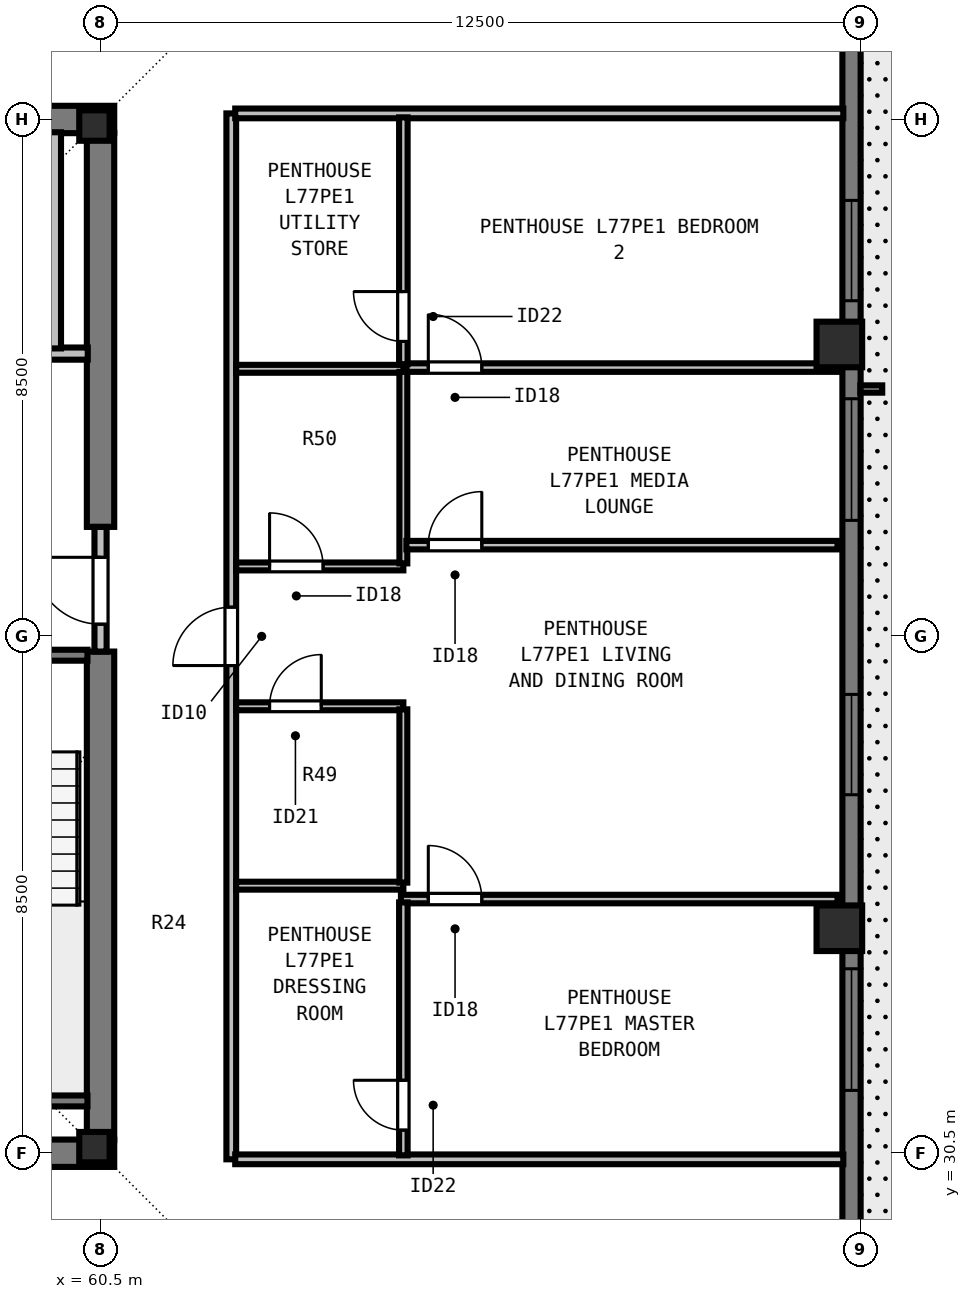
"""IFC4 building model, lengths in metres.
Left out: names, types, materials, properties, quantities, classifications, styles, units other than length and angle.
Written with IfcOpenShell. Run it as: python <this file> out.ifc"""

import sys

from ifc_helpers import new_model, si_unit, direction, frame, frame_2d, origin, origin_2d, place, context, subcontext, project, spatial, rectangle, i_section, extrude, element, fill, save


model = new_model("IFC4")
c1 = context("Model", 3, precision=1e-05, world=origin(), true_north=direction((0.0, 1.0)))
c2 = subcontext(c1, "Body", "Model", "MODEL_VIEW")
j1 = project(units=[si_unit("LENGTHUNIT", "METRE"), si_unit("PLANEANGLEUNIT", "RADIAN")], contexts=[c1])
p1 = place(None, origin())
s1 = spatial("IfcSite", under=j1, at=p1, CompositionType="ELEMENT")
p2 = place(p1, origin())
s2 = spatial("IfcBuilding", under=s1, at=p2, CompositionType="ELEMENT")
p3 = place(p2, frame((0.0, 0.0, 280.5)))
s3 = spatial("IfcBuildingStorey", under=s2, at=p3, CompositionType="ELEMENT", Elevation=280.5)
for number, where, z_axis, x_axis in (
    (1, (60.4, 30.6, 0.0), (0.0, 0.0, 1.0), (1.0, 0.0, 0.0)),
    (2, (60.4, 47.4, 0.0), (0.0, 0.0, 1.0), (1.0, 0.0, 0.0)),
):
    element("IfcColumn", number, at=place(p3, frame(where, z_axis=z_axis, x_axis=x_axis)), inside=s3, PredefinedType="COLUMN", context=c2, shape_type="SweptSolid", body=[
        extrude(i_section(OverallWidth=0.5, OverallDepth=0.5, WebThickness=0.028, FlangeThickness=0.045, at=origin_2d()), origin(), (0.0, 0.0, 1.0), 3.5),
    ])
for number, where, z_axis, x_axis in (
    (3, (72.65, 34.2, 0.0), (0.0, 0.0, 1.0), (0.0, 1.0, 0.0)),
    (4, (72.65, 43.8, 0.0), (0.0, 0.0, 1.0), (0.0, 1.0, 0.0)),
):
    element("IfcColumn", number, at=place(p3, frame(where, z_axis=z_axis, x_axis=x_axis)), inside=s3, PredefinedType="COLUMN", context=c2, shape_type="SweptSolid", body=[
        extrude(rectangle(XDim=0.75, YDim=0.75, at=origin_2d()), origin(), (0.0, 0.0, 1.0), 3.5),
    ])
p4 = place(p3, frame((72.85, 54.5, 0.0), z_axis=(0.0, 0.0, 1.0), x_axis=(0.0, -1.0, 0.0)))
e5 = element("IfcWall", 5, at=p4, inside=s3, PredefinedType="SOLIDWALL", context=c2, shape_type="SweptSolid", body=[
    extrude(rectangle(XDim=30.722, YDim=0.3, at=frame_2d((15.361, 0.0))), origin(), (0.0, 0.0, 1.0), 3.29),
])
p5 = place(p4, frame((8.331, 0.0, 0.8)))
e6 = element("IfcOpeningElement", 6, at=p5, cuts=e5, PredefinedType="OPENING", context=c2, shape_type="SweptSolid", body=[
    extrude(rectangle(XDim=1.65, YDim=1.758, at=frame_2d((0.825, 0.879))), frame((0.0, 0.16, 0.0), z_axis=(0.0, -1.0, 0.0), x_axis=(1.0, 0.0, 0.0)), (0.0, 0.0, 1.0), 0.32),
])
p6 = place(p4, frame((11.593, 0.0, 0.8)))
e7 = element("IfcOpeningElement", 7, at=p6, cuts=e5, PredefinedType="OPENING", context=c2, shape_type="SweptSolid", body=[
    extrude(rectangle(XDim=2.0, YDim=1.758, at=frame_2d((1.0, 0.879))), frame((0.0, 0.16, 0.0), z_axis=(0.0, -1.0, 0.0), x_axis=(1.0, 0.0, 0.0)), (0.0, 0.0, 1.0), 0.32),
])
p7 = place(p4, frame((16.455, 0.0, 0.8)))
e8 = element("IfcOpeningElement", 8, at=p7, cuts=e5, PredefinedType="OPENING", context=c2, shape_type="SweptSolid", body=[
    extrude(rectangle(XDim=1.65, YDim=1.758, at=frame_2d((0.825, 0.879))), frame((0.0, 0.16, 0.0), z_axis=(0.0, -1.0, 0.0), x_axis=(1.0, 0.0, 0.0)), (0.0, 0.0, 1.0), 0.32),
])
p8 = place(p4, frame((20.967, 0.0, 0.8)))
e9 = element("IfcOpeningElement", 9, at=p8, cuts=e5, PredefinedType="OPENING", context=c2, shape_type="SweptSolid", body=[
    extrude(rectangle(XDim=2.0, YDim=1.758, at=frame_2d((1.0, 0.879))), frame((0.0, 0.16, 0.0), z_axis=(0.0, -1.0, 0.0), x_axis=(1.0, 0.0, 0.0)), (0.0, 0.0, 1.0), 0.32),
])
for number, where, z_axis, x_axis in (
    (10, (43.275, 30.5, 0.0), (0.0, 0.0, 1.0), (1.0, 0.0, 0.0)),
    (11, (43.275, 47.5, 0.0), (0.0, 0.0, 1.0), (1.0, 0.0, 0.0)),
):
    element("IfcWall", number, at=place(p3, frame(where, z_axis=z_axis, x_axis=x_axis)), inside=s3, PredefinedType="SHEAR", context=c2, shape_type="SweptSolid", body=[
        extrude(rectangle(XDim=17.45, YDim=0.45, at=frame_2d((8.725, 0.0))), origin(), (0.0, 0.0, 1.0), 3.29),
    ])
p9 = place(p3, frame((60.5, 30.715, 0.0), z_axis=(0.0, 0.0, 1.0), x_axis=(0.0, 1.0, 0.0)))
e12 = element("IfcWall", 12, at=p9, inside=s3, PredefinedType="SHEAR", context=c2, shape_type="SweptSolid", body=[
    extrude(rectangle(XDim=8.035, YDim=0.45, at=frame_2d((4.018, 0.0))), origin(), (0.0, 0.0, 1.0), 3.29),
])
p10 = place(p3, frame((60.5, 40.8, 0.0), z_axis=(0.0, 0.0, 1.0), x_axis=(0.0, 1.0, 0.0)))
e13 = element("IfcWall", 13, at=p10, inside=s3, PredefinedType="SHEAR", context=c2, shape_type="SweptSolid", body=[
    extrude(rectangle(XDim=6.485, YDim=0.45, at=frame_2d((3.242, 0.0))), origin(), (0.0, 0.0, 1.0), 3.29),
])
p11 = place(p3, frame((60.5, 38.75, 0.0), z_axis=(0.0, 0.0, 1.0), x_axis=(0.0, 1.0, 0.0)))
e14 = element("IfcWall", 14, at=p11, inside=s3, PredefinedType="SOLIDWALL", context=c2, shape_type="SweptSolid", body=[
    extrude(rectangle(XDim=2.05, YDim=0.2, at=frame_2d((1.025, 0.0))), origin(), (0.0, 0.0, 1.0), 3.29),
])
p12 = place(p11, frame((0.45, 0.0, 0.0)))
e15 = element("IfcOpeningElement", 15, at=p12, cuts=e14, PredefinedType="OPENING", context=c2, shape_type="SweptSolid", body=[
    extrude(rectangle(XDim=1.1, YDim=2.15, at=frame_2d((0.55, 1.075))), frame((0.0, 0.11, 0.0), z_axis=(0.0, -1.0, 0.0), x_axis=(1.0, 0.0, 0.0)), (0.0, 0.0, 1.0), 0.22),
])
p13 = place(p3, frame((56.735, 43.65, 0.0), z_axis=(0.0, 0.0, 1.0), x_axis=(1.0, 0.0, 0.0)))
e16 = element("IfcWall", 16, at=p13, inside=s3, PredefinedType="SOLIDWALL", context=c2, shape_type="SweptSolid", body=[
    extrude(rectangle(XDim=3.555, YDim=0.2, at=frame_2d((1.777, 0.0))), origin(), (0.0, 0.0, 1.0), 3.29),
])
p14 = place(p13, frame((1.295, 0.0, 0.0)))
e17 = element("IfcOpeningElement", 17, at=p14, cuts=e16, PredefinedType="OPENING", context=c2, shape_type="SweptSolid", body=[
    extrude(rectangle(XDim=1.1, YDim=2.2, at=frame_2d((0.55, 1.1))), frame((0.0, 0.11, 0.0), z_axis=(0.0, -1.0, 0.0), x_axis=(1.0, 0.0, 0.0)), (0.0, 0.0, 1.0), 0.22),
])
p15 = place(p3, frame((59.75, 43.735, 0.0), z_axis=(0.0, 0.0, 1.0), x_axis=(0.0, 1.0, 0.0)))
e18 = element("IfcWall", 18, at=p15, inside=s3, PredefinedType="SOLIDWALL", context=c2, shape_type="SweptSolid", body=[
    extrude(rectangle(XDim=3.555, YDim=0.2, at=frame_2d((1.777, 0.0))), origin(), (0.0, 0.0, 1.0), 3.29),
])
p16 = place(p3, frame((62.65, 30.4, 0.0), z_axis=(0.0, 0.0, 1.0), x_axis=(0.0, 1.0, 0.0)))
e19 = element("IfcWall", 19, at=p16, inside=s3, PredefinedType="PARTITIONING", context=c2, shape_type="SweptSolid", body=[
    extrude(rectangle(XDim=17.2, YDim=0.16, at=frame_2d((8.6, 0.0))), origin(), (0.0, 0.0, 1.0), 3.29),
])
p17 = place(p16, frame((8.12, 0.0, 0.0)))
e20 = element("IfcOpeningElement", 20, at=p17, cuts=e19, PredefinedType="OPENING", context=c2, shape_type="SweptSolid", body=[
    extrude(rectangle(XDim=0.96, YDim=2.18, at=frame_2d((0.48, 1.09))), frame((0.0, 0.09, 0.0), z_axis=(0.0, -1.0, 0.0), x_axis=(1.0, 0.0, 0.0)), (0.0, 0.0, 1.0), 0.18),
])
for number, where, z_axis, x_axis in (
    (21, (62.715, 30.4, 0.0), (0.0, 0.0, 1.0), (1.0, 0.0, 0.0)),
    (22, (62.715, 47.6, 0.0), (0.0, 0.0, 1.0), (1.0, 0.0, 0.0)),
):
    element("IfcWall", number, at=place(p3, frame(where, z_axis=z_axis, x_axis=x_axis)), inside=s3, PredefinedType="PARTITIONING", context=c2, shape_type="SweptSolid", body=[
        extrude(rectangle(XDim=10.0, YDim=0.16, at=frame_2d((5.0, 0.0))), origin(), (0.0, 0.0, 1.0), 3.29),
    ])
p18 = place(p3, frame((62.73, 34.9, 0.0), z_axis=(0.0, 0.0, 1.0), x_axis=(1.0, 0.0, 0.0)))
e23 = element("IfcWall", 23, at=p18, inside=s3, PredefinedType="PLUMBINGWALL", context=c2, shape_type="SweptSolid", body=[
    extrude(rectangle(XDim=2.75, YDim=0.13, at=frame_2d((1.375, 0.0))), origin(), (0.0, 0.0, 1.0), 3.29),
])
p19 = place(p3, frame((62.73, 37.85, 0.0), z_axis=(0.0, 0.0, 1.0), x_axis=(1.0, 0.0, 0.0)))
e24 = element("IfcWall", 24, at=p19, inside=s3, PredefinedType="PLUMBINGWALL", context=c2, shape_type="SweptSolid", body=[
    extrude(rectangle(XDim=2.75, YDim=0.13, at=frame_2d((1.375, 0.0))), origin(), (0.0, 0.0, 1.0), 3.29),
])
p20 = place(p19, frame((0.55, 0.0, 0.0)))
e25 = element("IfcOpeningElement", 25, at=p20, cuts=e24, PredefinedType="OPENING", context=c2, shape_type="SweptSolid", body=[
    extrude(rectangle(XDim=0.85, YDim=2.08, at=frame_2d((0.425, 1.04))), frame((0.0, 0.075, 0.0), z_axis=(0.0, -1.0, 0.0), x_axis=(1.0, 0.0, 0.0)), (0.0, 0.0, 1.0), 0.15),
])
p21 = place(p3, frame((65.48, 34.95, 0.0), z_axis=(0.0, 0.0, 1.0), x_axis=(0.0, 1.0, 0.0)))
e26 = element("IfcWall", 26, at=p21, inside=s3, PredefinedType="PLUMBINGWALL", context=c2, shape_type="SweptSolid", body=[
    extrude(rectangle(XDim=2.85, YDim=0.13, at=frame_2d((1.425, 0.0))), origin(), (0.0, 0.0, 1.0), 3.29),
])
p22 = place(p3, frame((62.73, 43.4, 0.0), z_axis=(0.0, 0.0, 1.0), x_axis=(1.0, 0.0, 0.0)))
e27 = element("IfcWall", 27, at=p22, inside=s3, PredefinedType="PLUMBINGWALL", context=c2, shape_type="SweptSolid", body=[
    extrude(rectangle(XDim=2.75, YDim=0.13, at=frame_2d((1.375, 0.0))), origin(), (0.0, 0.0, 1.0), 3.29),
])
p23 = place(p3, frame((62.73, 40.15, 0.0), z_axis=(0.0, 0.0, 1.0), x_axis=(1.0, 0.0, 0.0)))
e28 = element("IfcWall", 28, at=p23, inside=s3, PredefinedType="PLUMBINGWALL", context=c2, shape_type="SweptSolid", body=[
    extrude(rectangle(XDim=2.75, YDim=0.13, at=frame_2d((1.375, 0.0))), origin(), (0.0, 0.0, 1.0), 3.29),
])
p24 = place(p23, frame((0.55, 0.0, 0.0)))
e29 = element("IfcOpeningElement", 29, at=p24, cuts=e28, PredefinedType="OPENING", context=c2, shape_type="SweptSolid", body=[
    extrude(rectangle(XDim=0.88, YDim=2.1, at=frame_2d((0.44, 1.05))), frame((0.0, 0.075, 0.0), z_axis=(0.0, -1.0, 0.0), x_axis=(1.0, 0.0, 0.0)), (0.0, 0.0, 1.0), 0.15),
])
p25 = place(p3, frame((65.48, 40.2, 0.0), z_axis=(0.0, 0.0, 1.0), x_axis=(0.0, 1.0, 0.0)))
e30 = element("IfcWall", 30, at=p25, inside=s3, PredefinedType="PLUMBINGWALL", context=c2, shape_type="SweptSolid", body=[
    extrude(rectangle(XDim=3.15, YDim=0.13, at=frame_2d((1.575, 0.0))), origin(), (0.0, 0.0, 1.0), 3.29),
])
p26 = place(p3, frame((65.44, 34.68, 0.0), z_axis=(0.0, 0.0, 1.0), x_axis=(1.0, 0.0, 0.0)))
e31 = element("IfcWall", 31, at=p26, inside=s3, PredefinedType="PARTITIONING", context=c2, shape_type="SweptSolid", body=[
    extrude(rectangle(XDim=7.18, YDim=0.14, at=frame_2d((3.59, 0.0))), origin(), (0.0, 0.0, 1.0), 3.29),
])
p27 = place(p26, frame((0.45, 0.0, 0.0)))
e32 = element("IfcOpeningElement", 32, at=p27, cuts=e31, PredefinedType="OPENING", context=c2, shape_type="SweptSolid", body=[
    extrude(rectangle(XDim=0.88, YDim=2.1, at=frame_2d((0.44, 1.05))), frame((0.0, 0.08, 0.0), z_axis=(0.0, -1.0, 0.0), x_axis=(1.0, 0.0, 0.0)), (0.0, 0.0, 1.0), 0.16),
])
p28 = place(p3, frame((65.48, 30.465, 0.0), z_axis=(0.0, 0.0, 1.0), x_axis=(0.0, 1.0, 0.0)))
e33 = element("IfcWall", 33, at=p28, inside=s3, PredefinedType="PARTITIONING", context=c2, shape_type="SweptSolid", body=[
    extrude(rectangle(XDim=4.16, YDim=0.14, at=frame_2d((2.08, 0.0))), origin(), (0.0, 0.0, 1.0), 3.29),
])
p29 = place(p28, frame((0.415, 0.0, 0.0)))
e34 = element("IfcOpeningElement", 34, at=p29, cuts=e33, PredefinedType="OPENING", context=c2, shape_type="SweptSolid", body=[
    extrude(rectangle(XDim=0.82, YDim=2.1, at=frame_2d((0.41, 1.05))), frame((0.0, 0.08, 0.0), z_axis=(0.0, -1.0, 0.0), x_axis=(1.0, 0.0, 0.0)), (0.0, 0.0, 1.0), 0.16),
])
p30 = place(p3, frame((65.53, 43.42, 0.0), z_axis=(0.0, 0.0, 1.0), x_axis=(1.0, 0.0, 0.0)))
e35 = element("IfcWall", 35, at=p30, inside=s3, PredefinedType="PARTITIONING", context=c2, shape_type="SweptSolid", body=[
    extrude(rectangle(XDim=7.09, YDim=0.14, at=frame_2d((3.545, 0.0))), origin(), (0.0, 0.0, 1.0), 3.29),
])
p31 = place(p30, frame((0.36, 0.0, 0.0)))
e36 = element("IfcOpeningElement", 36, at=p31, cuts=e35, PredefinedType="OPENING", context=c2, shape_type="SweptSolid", body=[
    extrude(rectangle(XDim=0.88, YDim=2.1, at=frame_2d((0.44, 1.05))), frame((0.0, 0.08, 0.0), z_axis=(0.0, -1.0, 0.0), x_axis=(1.0, 0.0, 0.0)), (0.0, 0.0, 1.0), 0.16),
])
p32 = place(p3, frame((65.48, 43.475, 0.0), z_axis=(0.0, 0.0, 1.0), x_axis=(0.0, 1.0, 0.0)))
e37 = element("IfcWall", 37, at=p32, inside=s3, PredefinedType="PARTITIONING", context=c2, shape_type="SweptSolid", body=[
    extrude(rectangle(XDim=4.06, YDim=0.14, at=frame_2d((2.03, 0.0))), origin(), (0.0, 0.0, 1.0), 3.29),
])
p33 = place(p32, frame((0.375, 0.0, 0.0)))
e38 = element("IfcOpeningElement", 38, at=p33, cuts=e37, PredefinedType="OPENING", context=c2, shape_type="SweptSolid", body=[
    extrude(rectangle(XDim=0.82, YDim=2.1, at=frame_2d((0.41, 1.05))), frame((0.0, 0.08, 0.0), z_axis=(0.0, -1.0, 0.0), x_axis=(1.0, 0.0, 0.0)), (0.0, 0.0, 1.0), 0.16),
])
p34 = place(p3, frame((65.53, 40.5, 0.0), z_axis=(0.0, 0.0, 1.0), x_axis=(1.0, 0.0, 0.0)))
e39 = element("IfcWall", 39, at=p34, inside=s3, PredefinedType="PARTITIONING", context=c2, shape_type="SweptSolid", body=[
    extrude(rectangle(XDim=7.09, YDim=0.14, at=frame_2d((3.545, 0.0))), origin(), (0.0, 0.0, 1.0), 3.29),
])
p35 = place(p34, frame((0.36, 0.0, 0.0)))
e40 = element("IfcOpeningElement", 40, at=p35, cuts=e39, PredefinedType="OPENING", context=c2, shape_type="SweptSolid", body=[
    extrude(rectangle(XDim=0.88, YDim=2.1, at=frame_2d((0.44, 1.05))), frame((0.0, 0.08, 0.0), z_axis=(0.0, -1.0, 0.0), x_axis=(1.0, 0.0, 0.0)), (0.0, 0.0, 1.0), 0.16),
])
p36 = place(p3, frame((57.005, 38.69, 0.0), z_axis=(0.0, 0.0, 1.0), x_axis=(1.0, 0.0, 0.0)))
e41 = element("IfcWall", 41, at=p36, inside=s3, PredefinedType="SOLIDWALL", context=c2, shape_type="SweptSolid", body=[
    extrude(rectangle(XDim=3.28, YDim=0.18, at=frame_2d((1.64, 0.0))), origin(), (0.0, 0.0, 1.0), 3.29),
])
p37 = place(p36, frame((1.165, 0.0, 0.0)))
e42 = element("IfcOpeningElement", 42, at=p37, cuts=e41, PredefinedType="OPENING", context=c2, shape_type="SweptSolid", body=[
    extrude(rectangle(XDim=0.95, YDim=2.15, at=frame_2d((0.475, 1.075))), frame((0.0, 0.1, 0.0), z_axis=(0.0, -1.0, 0.0), x_axis=(1.0, 0.0, 0.0)), (0.0, 0.0, 1.0), 0.2),
])
p38 = place(p3, frame((57.005, 31.36, 0.0), z_axis=(0.0, 0.0, 1.0), x_axis=(1.0, 0.0, 0.0)))
e43 = element("IfcWall", 43, at=p38, inside=s3, PredefinedType="SOLIDWALL", context=c2, shape_type="SweptSolid", body=[
    extrude(rectangle(XDim=3.28, YDim=0.18, at=frame_2d((1.64, 0.0))), origin(), (0.0, 0.0, 1.0), 3.29),
])
p39 = place(p5, origin())
e44 = element("IfcWindow", 44, at=p39, inside=s3, PartitioningType="SINGLE_PANEL", PredefinedType="WINDOW", context=c2, shape_type="SweptSolid", body=[
    extrude(rectangle(XDim=1.65, YDim=1.758, at=frame_2d((0.825, 0.879))), frame((0.0, -0.05, 0.0), z_axis=(0.0, -1.0, 0.0), x_axis=(1.0, 0.0, 0.0)), (0.0, 0.0, 1.0), 0.06),
])
fill(e6, e44)
p40 = place(p6, origin())
e45 = element("IfcWindow", 45, at=p40, inside=s3, PartitioningType="SINGLE_PANEL", PredefinedType="WINDOW", context=c2, shape_type="SweptSolid", body=[
    extrude(rectangle(XDim=2.0, YDim=1.758, at=frame_2d((1.0, 0.879))), frame((0.0, -0.05, 0.0), z_axis=(0.0, -1.0, 0.0), x_axis=(1.0, 0.0, 0.0)), (0.0, 0.0, 1.0), 0.06),
])
fill(e7, e45)
p41 = place(p7, origin())
e46 = element("IfcWindow", 46, at=p41, inside=s3, PartitioningType="SINGLE_PANEL", PredefinedType="WINDOW", context=c2, shape_type="SweptSolid", body=[
    extrude(rectangle(XDim=1.65, YDim=1.758, at=frame_2d((0.825, 0.879))), frame((0.0, -0.05, 0.0), z_axis=(0.0, -1.0, 0.0), x_axis=(1.0, 0.0, 0.0)), (0.0, 0.0, 1.0), 0.06),
])
fill(e8, e46)
p42 = place(p8, origin())
e47 = element("IfcWindow", 47, at=p42, inside=s3, PartitioningType="SINGLE_PANEL", PredefinedType="WINDOW", context=c2, shape_type="SweptSolid", body=[
    extrude(rectangle(XDim=2.0, YDim=1.758, at=frame_2d((1.0, 0.879))), frame((0.0, -0.05, 0.0), z_axis=(0.0, -1.0, 0.0), x_axis=(1.0, 0.0, 0.0)), (0.0, 0.0, 1.0), 0.06),
])
fill(e9, e47)
p43 = place(p12, origin())
e48 = element("IfcDoor", 48, at=p43, inside=s3, OperationType="SINGLE_SWING_RIGHT", PredefinedType="DOOR", context=c2, shape_type="SweptSolid", body=[
    extrude(rectangle(XDim=1.1, YDim=2.15, at=frame_2d((0.55, 1.075))), frame((0.0, 0.025, 0.0), z_axis=(0.0, -1.0, 0.0), x_axis=(1.0, 0.0, 0.0)), (0.0, 0.0, 1.0), 0.05),
])
fill(e15, e48)
p44 = place(p20, origin())
e49 = element("IfcDoor", 49, at=p44, inside=s3, OperationType="SINGLE_SWING_RIGHT", PredefinedType="DOOR", context=c2, shape_type="SweptSolid", body=[
    extrude(rectangle(XDim=0.85, YDim=2.08, at=frame_2d((0.425, 1.04))), frame((0.0, 0.025, 0.0), z_axis=(0.0, -1.0, 0.0), x_axis=(1.0, 0.0, 0.0)), (0.0, 0.0, 1.0), 0.05),
])
fill(e25, e49)
p45 = place(p24, origin())
e50 = element("IfcDoor", 50, at=p45, inside=s3, OperationType="SINGLE_SWING_LEFT", PredefinedType="DOOR", context=c2, shape_type="SweptSolid", body=[
    extrude(rectangle(XDim=0.88, YDim=2.1, at=frame_2d((0.44, 1.05))), frame((0.0, 0.025, 0.0), z_axis=(0.0, -1.0, 0.0), x_axis=(1.0, 0.0, 0.0)), (0.0, 0.0, 1.0), 0.05),
])
fill(e29, e50)
p46 = place(p29, origin())
e51 = element("IfcDoor", 51, at=p46, inside=s3, OperationType="SINGLE_SWING_RIGHT", PredefinedType="DOOR", context=c2, shape_type="SweptSolid", body=[
    extrude(rectangle(XDim=0.82, YDim=2.1, at=frame_2d((0.41, 1.05))), frame((0.0, 0.025, 0.0), z_axis=(0.0, -1.0, 0.0), x_axis=(1.0, 0.0, 0.0)), (0.0, 0.0, 1.0), 0.05),
])
fill(e34, e51)
p47 = place(p27, origin())
e52 = element("IfcDoor", 52, at=p47, inside=s3, OperationType="SINGLE_SWING_LEFT", PredefinedType="DOOR", context=c2, shape_type="SweptSolid", body=[
    extrude(rectangle(XDim=0.88, YDim=2.1, at=frame_2d((0.44, 1.05))), frame((0.0, 0.025, 0.0), z_axis=(0.0, -1.0, 0.0), x_axis=(1.0, 0.0, 0.0)), (0.0, 0.0, 1.0), 0.05),
])
fill(e32, e52)
p48 = place(p33, origin())
e53 = element("IfcDoor", 53, at=p48, inside=s3, OperationType="SINGLE_SWING_RIGHT", PredefinedType="DOOR", context=c2, shape_type="SweptSolid", body=[
    extrude(rectangle(XDim=0.82, YDim=2.1, at=frame_2d((0.41, 1.05))), frame((0.0, 0.025, 0.0), z_axis=(0.0, -1.0, 0.0), x_axis=(1.0, 0.0, 0.0)), (0.0, 0.0, 1.0), 0.05),
])
fill(e38, e53)
p49 = place(p31, origin())
e54 = element("IfcDoor", 54, at=p49, inside=s3, OperationType="SINGLE_SWING_LEFT", PredefinedType="DOOR", context=c2, shape_type="SweptSolid", body=[
    extrude(rectangle(XDim=0.88, YDim=2.1, at=frame_2d((0.44, 1.05))), frame((0.0, 0.025, 0.0), z_axis=(0.0, -1.0, 0.0), x_axis=(1.0, 0.0, 0.0)), (0.0, 0.0, 1.0), 0.05),
])
fill(e36, e54)
p50 = place(p35, origin())
e55 = element("IfcDoor", 55, at=p50, inside=s3, OperationType="SINGLE_SWING_RIGHT", PredefinedType="DOOR", context=c2, shape_type="SweptSolid", body=[
    extrude(rectangle(XDim=0.88, YDim=2.1, at=frame_2d((0.44, 1.05))), frame((0.0, 0.025, 0.0), z_axis=(0.0, -1.0, 0.0), x_axis=(1.0, 0.0, 0.0)), (0.0, 0.0, 1.0), 0.05),
])
fill(e40, e55)
p51 = place(p17, origin())
e56 = element("IfcDoor", 56, at=p51, inside=s3, OperationType="SINGLE_SWING_LEFT", PredefinedType="DOOR", context=c2, shape_type="SweptSolid", body=[
    extrude(rectangle(XDim=0.96, YDim=2.18, at=frame_2d((0.48, 1.09))), frame((0.0, 0.025, 0.0), z_axis=(0.0, -1.0, 0.0), x_axis=(1.0, 0.0, 0.0)), (0.0, 0.0, 1.0), 0.05),
])
fill(e20, e56)
save(model, sys.argv[1])
